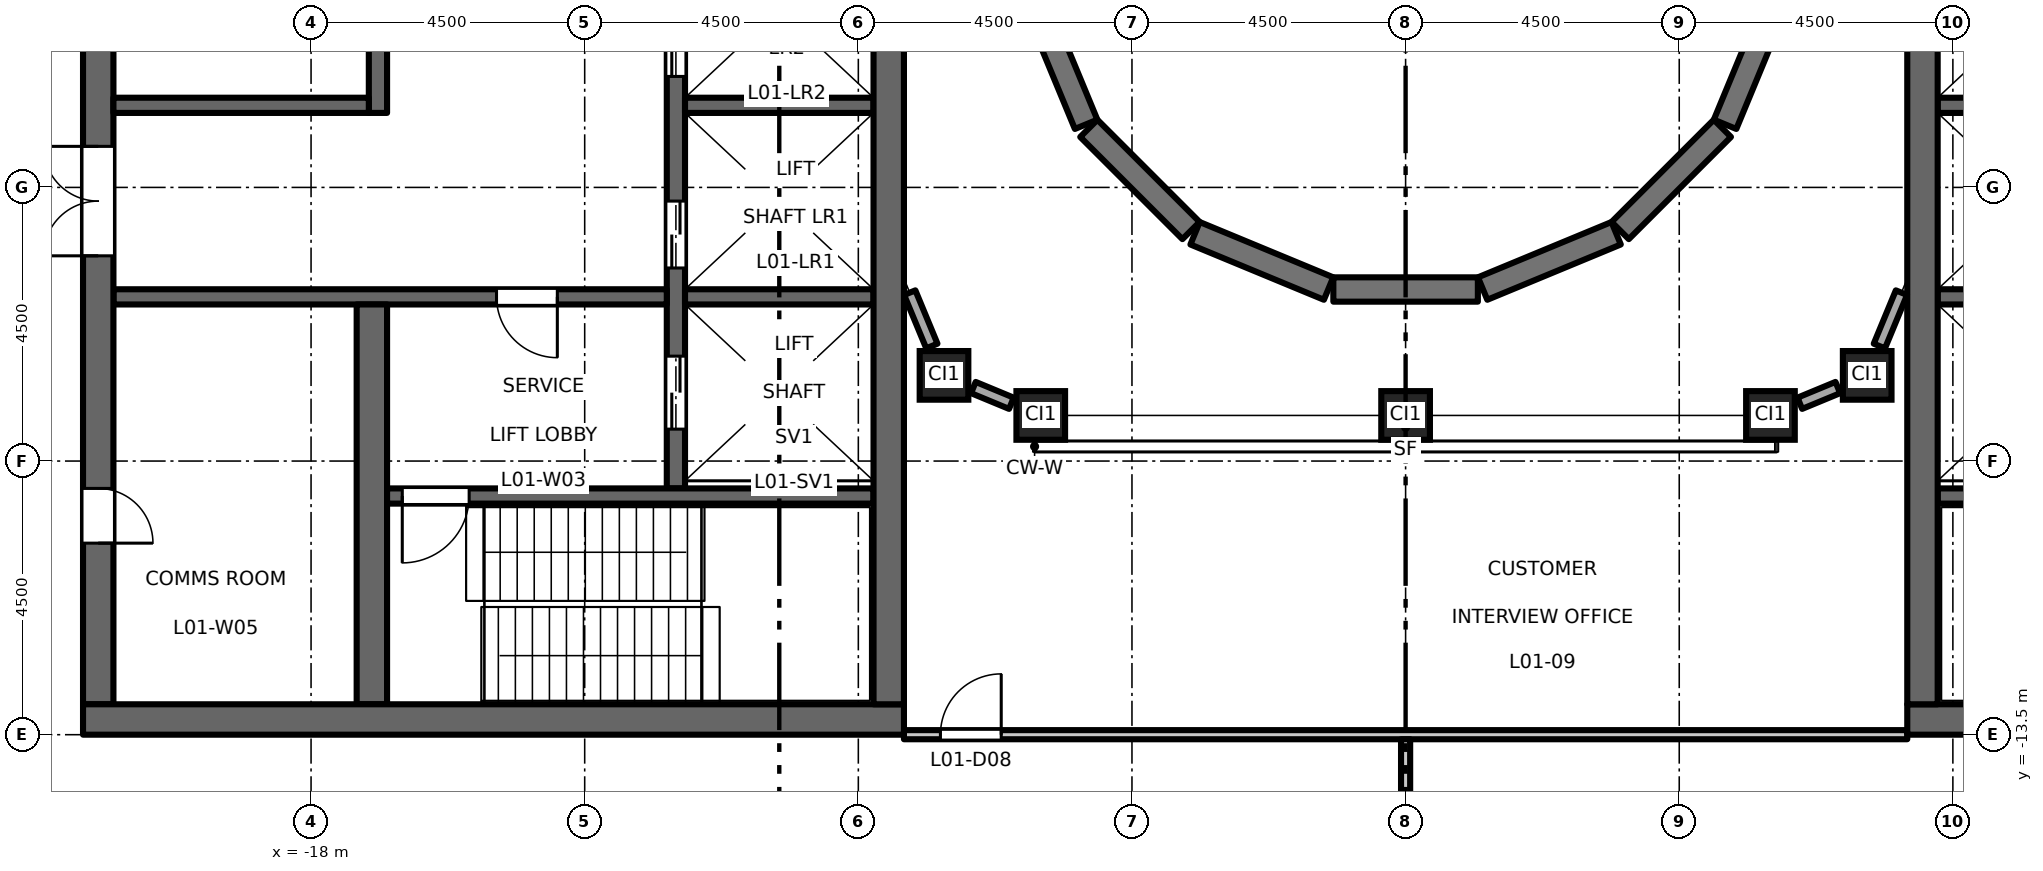
"""IFC4 building model, lengths in metres.
Left out: names, types, materials, properties, quantities, classifications, styles, units other than length and angle.
Written with IfcOpenShell. Run it as: python <this file> out.ifc"""

import sys

from ifc_helpers import new_model, si_unit, direction, frame, frame_2d, origin, origin_2d, place, context, subcontext, project, spatial, rectangle, hollow_rectangle, extrude, element, fill, save


model = new_model("IFC4")
c1 = context("Model", 3, precision=1e-05, world=origin(), true_north=direction((0.0, 1.0)))
c2 = subcontext(c1, "Body", "Model", "MODEL_VIEW")
j1 = project(units=[si_unit("LENGTHUNIT", "METRE"), si_unit("PLANEANGLEUNIT", "RADIAN")], contexts=[c1])
p1 = place(None, origin())
s1 = spatial("IfcSite", under=j1, at=p1, CompositionType="ELEMENT")
p2 = place(p1, origin())
s2 = spatial("IfcBuilding", under=s1, at=p2, CompositionType="ELEMENT")
p3 = place(p2, frame((0.0, 0.0, 7.2)))
s3 = spatial("IfcBuildingStorey", under=s2, at=p3, CompositionType="ELEMENT", Elevation=7.2)
for number, where, z_axis, x_axis in (
    (1, (-7.591, -7.591, 0.0), (0.0, 0.0, 1.0), (1.0, 0.0, 0.0)),
    (2, (-6.0, -8.25, 0.0), (0.0, 0.0, 1.0), (1.0, 0.0, 0.0)),
    (3, (0.0, -8.25, 0.0), (0.0, 0.0, 1.0), (1.0, 0.0, 0.0)),
    (4, (6.0, -8.25, 0.0), (0.0, 0.0, 1.0), (1.0, 0.0, 0.0)),
    (5, (7.591, -7.591, 0.0), (0.0, 0.0, 1.0), (1.0, 0.0, 0.0)),
):
    element("IfcColumn", number, at=place(p3, frame(where, z_axis=z_axis, x_axis=x_axis)), inside=s3, PredefinedType="COLUMN", context=c2, shape_type="SweptSolid", body=[
        extrude(hollow_rectangle(XDim=0.8, YDim=0.8, WallThickness=0.05, at=origin_2d()), origin(), (0.0, 0.0, 1.0), 5.0),
    ])
p4 = place(p3, frame((-12.0, -9.45, 0.0), z_axis=(0.0, 0.0, 1.0), x_axis=(0.0, 1.0, 0.0)))
e6 = element("IfcWall", 6, at=p4, inside=s3, PredefinedType="SHEAR", context=c2, shape_type="SweptSolid", body=[
    extrude(rectangle(XDim=18.9, YDim=0.3, at=frame_2d((9.45, 0.0))), origin(), (0.0, 0.0, 1.0), 4.8),
])
p5 = place(p4, frame((3.625, 0.0, 0.0)))
e7 = element("IfcOpeningElement", 7, at=p5, cuts=e6, PredefinedType="OPENING", context=c2, shape_type="SweptSolid", body=[
    extrude(rectangle(XDim=1.1, YDim=2.1, at=frame_2d((0.55, 1.05))), frame((0.0, 0.16, 0.0), z_axis=(0.0, -1.0, 0.0), x_axis=(1.0, 0.0, 0.0)), (0.0, 0.0, 1.0), 0.32),
])
p6 = place(p4, frame((6.775, 0.0, 0.0)))
e8 = element("IfcOpeningElement", 8, at=p6, cuts=e6, PredefinedType="OPENING", context=c2, shape_type="SweptSolid", body=[
    extrude(rectangle(XDim=1.1, YDim=2.1, at=frame_2d((0.55, 1.05))), frame((0.0, 0.16, 0.0), z_axis=(0.0, -1.0, 0.0), x_axis=(1.0, 0.0, 0.0)), (0.0, 0.0, 1.0), 0.32),
])
p7 = place(p4, frame((9.925, 0.0, 0.0)))
e9 = element("IfcOpeningElement", 9, at=p7, cuts=e6, PredefinedType="OPENING", context=c2, shape_type="SweptSolid", body=[
    extrude(rectangle(XDim=1.1, YDim=2.1, at=frame_2d((0.55, 1.05))), frame((0.0, 0.16, 0.0), z_axis=(0.0, -1.0, 0.0), x_axis=(1.0, 0.0, 0.0)), (0.0, 0.0, 1.0), 0.32),
])
p8 = place(p4, frame((13.075, 0.0, 0.0)))
e10 = element("IfcOpeningElement", 10, at=p8, cuts=e6, PredefinedType="OPENING", context=c2, shape_type="SweptSolid", body=[
    extrude(rectangle(XDim=1.1, YDim=2.1, at=frame_2d((0.55, 1.05))), frame((0.0, 0.16, 0.0), z_axis=(0.0, -1.0, 0.0), x_axis=(1.0, 0.0, 0.0)), (0.0, 0.0, 1.0), 0.32),
])
p9 = place(p4, frame((16.725, 0.0, 0.0)))
e11 = element("IfcOpeningElement", 11, at=p9, cuts=e6, PredefinedType="OPENING", context=c2, shape_type="SweptSolid", body=[
    extrude(rectangle(XDim=1.2, YDim=2.1, at=frame_2d((0.6, 1.05))), frame((0.0, 0.16, 0.0), z_axis=(0.0, -1.0, 0.0), x_axis=(1.0, 0.0, 0.0)), (0.0, 0.0, 1.0), 0.32),
])
p10 = place(p4, frame((0.975, 0.0, 0.0)))
e12 = element("IfcOpeningElement", 12, at=p10, cuts=e6, PredefinedType="OPENING", context=c2, shape_type="SweptSolid", body=[
    extrude(rectangle(XDim=1.2, YDim=2.1, at=frame_2d((0.6, 1.05))), frame((0.0, 0.16, 0.0), z_axis=(0.0, -1.0, 0.0), x_axis=(1.0, 0.0, 0.0)), (0.0, 0.0, 1.0), 0.32),
])
p11 = place(p3, frame((-12.15, -6.3, 0.0), z_axis=(0.0, 0.0, 1.0), x_axis=(-1.0, 0.0, 0.0)))
e13 = element("IfcWall", 13, at=p11, inside=s3, PredefinedType="SHEAR", context=c2, shape_type="SweptSolid", body=[
    extrude(rectangle(XDim=9.1, YDim=0.25, at=frame_2d((4.55, 0.0))), origin(), (0.0, 0.0, 1.0), 4.8),
])
p12 = place(p11, frame((1.8, 0.0, 0.0)))
e14 = element("IfcOpeningElement", 14, at=p12, cuts=e13, PredefinedType="OPENING", context=c2, shape_type="SweptSolid", body=[
    extrude(rectangle(XDim=1.0, YDim=2.1, at=frame_2d((0.5, 1.05))), frame((0.0, 0.135, 0.0), z_axis=(0.0, -1.0, 0.0), x_axis=(1.0, 0.0, 0.0)), (0.0, 0.0, 1.0), 0.27),
])
p13 = place(p3, frame((-21.5, -13.0, 0.0), z_axis=(0.0, 0.0, 1.0), x_axis=(0.0, 1.0, 0.0)))
e15 = element("IfcWall", 15, at=p13, inside=s3, PredefinedType="SHEAR", context=c2, shape_type="SweptSolid", body=[
    extrude(rectangle(XDim=26.0, YDim=0.5, at=frame_2d((13.0, 0.0))), origin(), (0.0, 0.0, 1.0), 4.8),
])
p14 = place(p13, frame((16.825, 0.0, 0.0)))
e16 = element("IfcOpeningElement", 16, at=p14, cuts=e15, PredefinedType="OPENING", context=c2, shape_type="SweptSolid", body=[
    extrude(rectangle(XDim=1.8, YDim=2.1, at=frame_2d((0.9, 1.05))), frame((0.0, 0.26, 0.0), z_axis=(0.0, -1.0, 0.0), x_axis=(1.0, 0.0, 0.0)), (0.0, 0.0, 1.0), 0.52),
])
p15 = place(p13, frame((7.375, 0.0, 0.0)))
e17 = element("IfcOpeningElement", 17, at=p15, cuts=e15, PredefinedType="OPENING", context=c2, shape_type="SweptSolid", body=[
    extrude(rectangle(XDim=1.8, YDim=2.1, at=frame_2d((0.9, 1.05))), frame((0.0, 0.26, 0.0), z_axis=(0.0, -1.0, 0.0), x_axis=(1.0, 0.0, 0.0)), (0.0, 0.0, 1.0), 0.52),
])
p16 = place(p13, frame((2.65, 0.0, 0.0)))
e18 = element("IfcOpeningElement", 18, at=p16, cuts=e15, PredefinedType="OPENING", context=c2, shape_type="SweptSolid", body=[
    extrude(rectangle(XDim=0.9, YDim=2.1, at=frame_2d((0.45, 1.05))), frame((0.0, 0.26, 0.0), z_axis=(0.0, -1.0, 0.0), x_axis=(1.0, 0.0, 0.0)), (0.0, 0.0, 1.0), 0.52),
])
p17 = place(p3, frame((-16.9, -3.275, 0.0), z_axis=(0.0, 0.0, 1.0), x_axis=(0.0, 1.0, 0.0)))
e19 = element("IfcWall", 19, at=p17, inside=s3, PredefinedType="SHEAR", context=c2, shape_type="SweptSolid", body=[
    extrude(rectangle(XDim=6.55, YDim=0.3, at=frame_2d((3.275, 0.0))), origin(), (0.0, 0.0, 1.0), 4.8),
])
p18 = place(p3, frame((-17.05, -3.15, 0.0), z_axis=(0.0, 0.0, 1.0), x_axis=(-1.0, 0.0, 0.0)))
e20 = element("IfcWall", 20, at=p18, inside=s3, PredefinedType="SHEAR", context=c2, shape_type="SweptSolid", body=[
    extrude(rectangle(XDim=4.2, YDim=0.25, at=frame_2d((2.1, 0.0))), origin(), (0.0, 0.0, 1.0), 4.8),
])
p19 = place(p3, frame((-17.0, -13.0, 0.0), z_axis=(0.0, 0.0, 1.0), x_axis=(0.0, 1.0, 0.0)))
e21 = element("IfcWall", 21, at=p19, inside=s3, PredefinedType="SHEAR", context=c2, shape_type="SweptSolid", body=[
    extrude(rectangle(XDim=6.575, YDim=0.5, at=frame_2d((3.288, 0.0))), origin(), (0.0, 0.0, 1.0), 4.8),
])
for number, where, z_axis, x_axis in (
    (22, (-8.75, -3.15, 0.0), (0.0, 0.0, 1.0), (-1.0, 0.0, 0.0)),
    (23, (-8.75, -6.3, 0.0), (0.0, 0.0, 1.0), (-1.0, 0.0, 0.0)),
):
    element("IfcWall", number, at=place(p3, frame(where, z_axis=z_axis, x_axis=x_axis)), inside=s3, PredefinedType="SHEAR", context=c2, shape_type="SweptSolid", body=[
        extrude(rectangle(XDim=3.1, YDim=0.25, at=frame_2d((1.55, 0.0))), origin(), (0.0, 0.0, 1.0), 4.8),
    ])
p20 = place(p3, frame((-8.75, -9.575, 0.0), z_axis=(0.0, 0.0, 1.0), x_axis=(-1.0, 0.0, 0.0)))
e24 = element("IfcWall", 24, at=p20, inside=s3, PredefinedType="SHEAR", context=c2, shape_type="SweptSolid", body=[
    extrude(rectangle(XDim=8.0, YDim=0.25, at=frame_2d((4.0, 0.0))), origin(), (0.0, 0.0, 1.0), 4.8),
])
p21 = place(p20, frame((6.65, 0.0, 0.0)))
e25 = element("IfcOpeningElement", 25, at=p21, cuts=e24, PredefinedType="OPENING", context=c2, shape_type="SweptSolid", body=[
    extrude(rectangle(XDim=1.1, YDim=2.1, at=frame_2d((0.55, 1.05))), frame((0.0, 0.135, 0.0), z_axis=(0.0, -1.0, 0.0), x_axis=(1.0, 0.0, 0.0)), (0.0, 0.0, 1.0), 0.27),
])
p22 = place(p3, frame((-8.25, -13.25, 0.0), z_axis=(0.0, 0.0, 1.0), x_axis=(-1.0, 0.0, 0.0)))
e26 = element("IfcWall", 26, at=p22, inside=s3, PredefinedType="SHEAR", context=c2, shape_type="SweptSolid", body=[
    extrude(rectangle(XDim=13.5, YDim=0.5, at=frame_2d((6.75, 0.0))), origin(), (0.0, 0.0, 1.0), 4.8),
])
p23 = place(p3, frame((-8.5, -13.0, 0.0), z_axis=(0.0, 0.0, 1.0), x_axis=(0.0, 1.0, 0.0)))
e27 = element("IfcWall", 27, at=p23, inside=s3, PredefinedType="SHEAR", context=c2, shape_type="SweptSolid", body=[
    extrude(rectangle(XDim=26.0, YDim=0.5, at=frame_2d((13.0, 0.0))), origin(), (0.0, 0.0, 1.0), 4.8),
])
for number, where, z_axis, x_axis in (
    (28, (8.75, -3.15, 0.0), (0.0, 0.0, 1.0), (1.0, 0.0, 0.0)),
    (29, (8.75, -6.3, 0.0), (0.0, 0.0, 1.0), (1.0, 0.0, 0.0)),
):
    element("IfcWall", number, at=place(p3, frame(where, z_axis=z_axis, x_axis=x_axis)), inside=s3, PredefinedType="SHEAR", context=c2, shape_type="SweptSolid", body=[
        extrude(rectangle(XDim=3.1, YDim=0.25, at=frame_2d((1.55, 0.0))), origin(), (0.0, 0.0, 1.0), 4.8),
    ])
p24 = place(p3, frame((8.75, -9.575, 0.0), z_axis=(0.0, 0.0, 1.0), x_axis=(1.0, 0.0, 0.0)))
e30 = element("IfcWall", 30, at=p24, inside=s3, PredefinedType="SHEAR", context=c2, shape_type="SweptSolid", body=[
    extrude(rectangle(XDim=8.0, YDim=0.25, at=frame_2d((4.0, 0.0))), origin(), (0.0, 0.0, 1.0), 4.8),
])
p25 = place(p24, frame((6.65, 0.0, 0.0)))
e31 = element("IfcOpeningElement", 31, at=p25, cuts=e30, PredefinedType="OPENING", context=c2, shape_type="SweptSolid", body=[
    extrude(rectangle(XDim=1.1, YDim=2.1, at=frame_2d((0.55, 1.05))), frame((0.0, 0.135, 0.0), z_axis=(0.0, -1.0, 0.0), x_axis=(1.0, 0.0, 0.0)), (0.0, 0.0, 1.0), 0.27),
])
p26 = place(p3, frame((8.25, -13.25, 0.0), z_axis=(0.0, 0.0, 1.0), x_axis=(1.0, 0.0, 0.0)))
e32 = element("IfcWall", 32, at=p26, inside=s3, PredefinedType="SHEAR", context=c2, shape_type="SweptSolid", body=[
    extrude(rectangle(XDim=13.5, YDim=0.5, at=frame_2d((6.75, 0.0))), origin(), (0.0, 0.0, 1.0), 4.8),
])
p27 = place(p3, frame((8.5, -13.0, 0.0), z_axis=(0.0, 0.0, 1.0), x_axis=(0.0, 1.0, 0.0)))
e33 = element("IfcWall", 33, at=p27, inside=s3, PredefinedType="SHEAR", context=c2, shape_type="SweptSolid", body=[
    extrude(rectangle(XDim=26.0, YDim=0.5, at=frame_2d((13.0, 0.0))), origin(), (0.0, 0.0, 1.0), 4.8),
])
p28 = place(p3, frame((6.483, -8.05, 0.0), z_axis=(0.0, 0.0, 1.0), x_axis=(0.923854141361, 0.382744726273, 0.0)))
e34 = element("IfcWall", 34, at=p28, inside=s3, PredefinedType="STANDARD", context=c2, shape_type="SweptSolid", body=[
    extrude(rectangle(XDim=0.677, YDim=0.2, at=frame_2d((0.338, 0.0))), origin(), (0.0, 0.0, 1.0), 4.18),
])
for number, where, z_axis, x_axis in (
    (35, (7.791, -7.108, 0.0), (0.0, 0.0, 1.0), (0.383, 0.924, 0.0)),
    (36, (-8.154, -6.231, 0.0), (0.0, 0.0, 1.0), (0.383, -0.924, 0.0)),
):
    element("IfcWall", number, at=place(p3, frame(where, z_axis=z_axis, x_axis=x_axis)), inside=s3, PredefinedType="STANDARD", context=c2, shape_type="SweptSolid", body=[
        extrude(rectangle(XDim=0.949, YDim=0.2, at=frame_2d((0.475, 0.0))), origin(), (0.0, 0.0, 1.0), 4.18),
    ])
p29 = place(p3, frame((-7.108, -7.791, 0.0), z_axis=(0.0, 0.0, 1.0), x_axis=(0.923854141361, -0.382744726273, 0.0)))
e37 = element("IfcWall", 37, at=p29, inside=s3, PredefinedType="STANDARD", context=c2, shape_type="SweptSolid", body=[
    extrude(rectangle(XDim=0.677, YDim=0.2, at=frame_2d((0.338, 0.0))), origin(), (0.0, 0.0, 1.0), 4.18),
])
p30 = place(p3, frame((-6.163, -1.267, 0.0), z_axis=(0.0, 0.0, 1.0), x_axis=(0.382681453552, -0.92388035216, 0.0)))
e38 = element("IfcWall", 38, at=p30, inside=s3, PredefinedType="SOLIDWALL", context=c2, shape_type="SweptSolid", body=[
    extrude(rectangle(XDim=2.376, YDim=0.4, at=frame_2d((1.188, 0.0))), origin(), (0.0, 0.0, 1.0), 5.0),
])
p31 = place(p3, frame((-5.209, -3.529, 0.0), z_axis=(0.0, 0.0, 1.0), x_axis=(0.707106781187, -0.707106781187, 0.0)))
e39 = element("IfcWall", 39, at=p31, inside=s3, PredefinedType="SOLIDWALL", context=c2, shape_type="SweptSolid", body=[
    extrude(rectangle(XDim=2.377, YDim=0.4, at=frame_2d((1.188, 0.0))), origin(), (0.0, 0.0, 1.0), 5.0),
])
for number, where, z_axis, x_axis in (
    (40, (-3.462, -5.254, 0.0), (0.0, 0.0, 1.0), (0.924, -0.383, 0.0)),
    (41, (-1.188, -6.179, 0.0), (0.0, 0.0, 1.0), (1.0, 0.0, 0.0)),
    (42, (1.267, -6.163, 0.0), (0.0, 0.0, 1.0), (0.924, 0.383, 0.0)),
):
    element("IfcWall", number, at=place(p3, frame(where, z_axis=z_axis, x_axis=x_axis)), inside=s3, PredefinedType="SOLIDWALL", context=c2, shape_type="SweptSolid", body=[
        extrude(rectangle(XDim=2.376, YDim=0.4, at=frame_2d((1.188, 0.0))), origin(), (0.0, 0.0, 1.0), 5.0),
    ])
p32 = place(p3, frame((3.529, -5.209, 0.0), z_axis=(0.0, 0.0, 1.0), x_axis=(0.707106781187, 0.707106781187, 0.0)))
e43 = element("IfcWall", 43, at=p32, inside=s3, PredefinedType="SOLIDWALL", context=c2, shape_type="SweptSolid", body=[
    extrude(rectangle(XDim=2.377, YDim=0.4, at=frame_2d((1.188, 0.0))), origin(), (0.0, 0.0, 1.0), 5.0),
])
p33 = place(p3, frame((5.254, -3.462, 0.0), z_axis=(0.0, 0.0, 1.0), x_axis=(0.382681453552, 0.92388035216, 0.0)))
e44 = element("IfcWall", 44, at=p33, inside=s3, PredefinedType="SOLIDWALL", context=c2, shape_type="SweptSolid", body=[
    extrude(rectangle(XDim=2.376, YDim=0.4, at=frame_2d((1.188, 0.0))), origin(), (0.0, 0.0, 1.0), 5.0),
])
p34 = place(p3, frame((-8.25, -13.5, 0.0), z_axis=(0.0, 0.0, 1.0), x_axis=(1.0, 0.0, 0.0)))
e45 = element("IfcWall", 45, at=p34, inside=s3, PredefinedType="PARTITIONING", context=c2, shape_type="SweptSolid", body=[
    extrude(rectangle(XDim=16.5, YDim=0.15, at=frame_2d((8.25, 0.0))), origin(), (0.0, 0.0, 1.0), 4.3),
])
p35 = place(p34, frame((0.6, 0.0, 0.0)))
e46 = element("IfcOpeningElement", 46, at=p35, cuts=e45, PredefinedType="OPENING", context=c2, shape_type="SweptSolid", body=[
    extrude(rectangle(XDim=1.0, YDim=2.1, at=frame_2d((0.5, 1.05))), frame((0.0, 0.085, 0.0), z_axis=(0.0, -1.0, 0.0), x_axis=(1.0, 0.0, 0.0)), (0.0, 0.0, 1.0), 0.17),
])
p36 = place(p3, frame((0.0, -20.925, 0.0), z_axis=(0.0, 0.0, 1.0), x_axis=(0.0, 1.0, 0.0)))
e47 = element("IfcWall", 47, at=p36, inside=s3, PredefinedType="PARTITIONING", context=c2, shape_type="SweptSolid", body=[
    extrude(rectangle(XDim=7.35, YDim=0.15, at=frame_2d((3.675, 0.0))), origin(), (0.0, 0.0, 1.0), 4.8),
])
p37 = place(p12, origin())
e48 = element("IfcDoor", 48, at=p37, inside=s3, OperationType="SINGLE_SWING_RIGHT", PredefinedType="DOOR", context=c2, shape_type="SweptSolid", body=[
    extrude(rectangle(XDim=1.0, YDim=2.1, at=frame_2d((0.5, 1.05))), frame((0.0, 0.025, 0.0), z_axis=(0.0, -1.0, 0.0), x_axis=(1.0, 0.0, 0.0)), (0.0, 0.0, 1.0), 0.05),
])
fill(e14, e48)
p38 = place(p21, origin())
e49 = element("IfcDoor", 49, at=p38, inside=s3, OperationType="SINGLE_SWING_LEFT", PredefinedType="DOOR", context=c2, shape_type="SweptSolid", body=[
    extrude(rectangle(XDim=1.1, YDim=2.1, at=frame_2d((0.55, 1.05))), frame((0.0, 0.025, 0.0), z_axis=(0.0, -1.0, 0.0), x_axis=(1.0, 0.0, 0.0)), (0.0, 0.0, 1.0), 0.05),
])
fill(e25, e49)
p39 = place(p15, origin())
e50 = element("IfcDoor", 50, at=p39, inside=s3, OperationType="DOUBLE_DOOR_DOUBLE_SWING", PredefinedType="DOOR", context=c2, shape_type="SweptSolid", body=[
    extrude(rectangle(XDim=1.8, YDim=2.1, at=frame_2d((0.9, 1.05))), frame((0.0, 0.025, 0.0), z_axis=(0.0, -1.0, 0.0), x_axis=(1.0, 0.0, 0.0)), (0.0, 0.0, 1.0), 0.05),
])
fill(e17, e50)
p40 = place(p5, origin())
e51 = element("IfcDoor", 51, at=p40, inside=s3, OperationType="DOUBLE_DOOR_SLIDING", PredefinedType="DOOR", context=c2, shape_type="SweptSolid", body=[
    extrude(rectangle(XDim=1.1, YDim=2.1, at=frame_2d((0.55, 1.05))), frame((0.0, 0.025, 0.0), z_axis=(0.0, -1.0, 0.0), x_axis=(1.0, 0.0, 0.0)), (0.0, 0.0, 1.0), 0.05),
])
fill(e7, e51)
p41 = place(p6, origin())
e52 = element("IfcDoor", 52, at=p41, inside=s3, OperationType="DOUBLE_DOOR_SLIDING", PredefinedType="DOOR", context=c2, shape_type="SweptSolid", body=[
    extrude(rectangle(XDim=1.1, YDim=2.1, at=frame_2d((0.55, 1.05))), frame((0.0, 0.025, 0.0), z_axis=(0.0, -1.0, 0.0), x_axis=(1.0, 0.0, 0.0)), (0.0, 0.0, 1.0), 0.05),
])
fill(e8, e52)
p42 = place(p10, origin())
e53 = element("IfcDoor", 53, at=p42, inside=s3, OperationType="DOUBLE_DOOR_SLIDING", PredefinedType="DOOR", context=c2, shape_type="SweptSolid", body=[
    extrude(rectangle(XDim=1.2, YDim=2.1, at=frame_2d((0.6, 1.05))), frame((0.0, 0.025, 0.0), z_axis=(0.0, -1.0, 0.0), x_axis=(1.0, 0.0, 0.0)), (0.0, 0.0, 1.0), 0.05),
])
fill(e12, e53)
p43 = place(p16, origin())
e54 = element("IfcDoor", 54, at=p43, inside=s3, OperationType="SINGLE_SWING_LEFT", PredefinedType="DOOR", context=c2, shape_type="SweptSolid", body=[
    extrude(rectangle(XDim=0.9, YDim=2.1, at=frame_2d((0.45, 1.05))), frame((0.0, 0.025, 0.0), z_axis=(0.0, -1.0, 0.0), x_axis=(1.0, 0.0, 0.0)), (0.0, 0.0, 1.0), 0.05),
])
fill(e18, e54)
p44 = place(p35, origin())
e55 = element("IfcDoor", 55, at=p44, inside=s3, OperationType="SINGLE_SWING_RIGHT", PredefinedType="DOOR", context=c2, shape_type="SweptSolid", body=[
    extrude(rectangle(XDim=1.0, YDim=2.1, at=frame_2d((0.5, 1.05))), frame((0.0, 0.025, 0.0), z_axis=(0.0, -1.0, 0.0), x_axis=(1.0, 0.0, 0.0)), (0.0, 0.0, 1.0), 0.05),
])
fill(e46, e55)
save(model, sys.argv[1])
